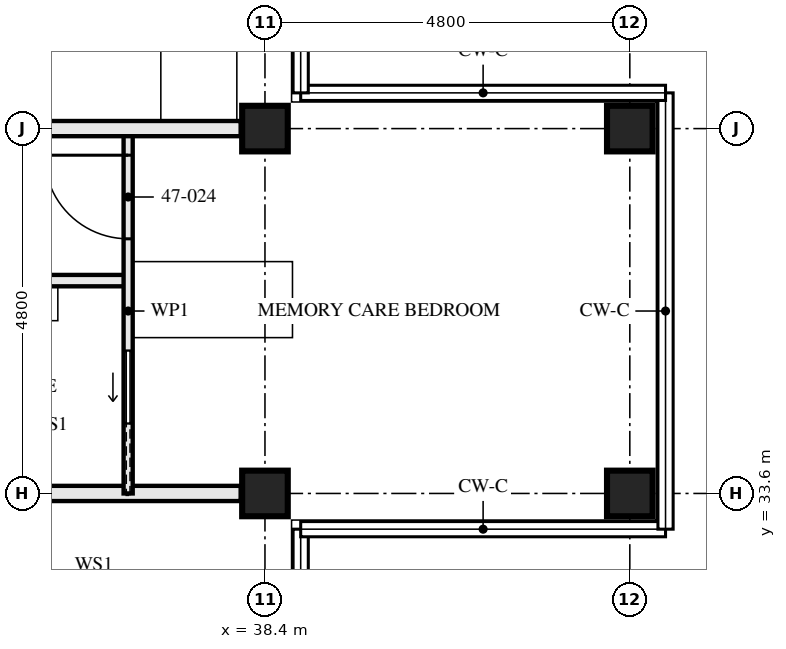
"""IFC4 building model, lengths in metres.
Left out: names, types, materials, properties, quantities, classifications, styles, units other than length and angle.
Written with IfcOpenShell. Run it as: python <this file> out.ifc"""

import sys

from ifc_helpers import new_model, si_unit, direction, frame, frame_2d, origin, origin_2d, place, context, subcontext, project, spatial, rectangle, hollow_rectangle, extrude, element, fill, save


model = new_model("IFC4")
c1 = context("Model", 3, precision=1e-05, world=origin(), true_north=direction((0.0, 1.0)))
c2 = subcontext(c1, "Body", "Model", "MODEL_VIEW")
j1 = project(units=[si_unit("LENGTHUNIT", "METRE"), si_unit("PLANEANGLEUNIT", "RADIAN")], contexts=[c1])
p1 = place(None, origin())
s1 = spatial("IfcSite", under=j1, at=p1, CompositionType="ELEMENT")
p2 = place(p1, origin())
s2 = spatial("IfcBuilding", under=s1, at=p2, CompositionType="ELEMENT")
p3 = place(p2, frame((0.0, 0.0, 172.5)))
s3 = spatial("IfcBuildingStorey", under=s2, at=p3, CompositionType="ELEMENT", Elevation=172.5)
for number, where, z_axis, x_axis in (
    (1, (38.4, 33.6, 0.0), (0.0, 0.0, 1.0), (0.0, 1.0, 0.0)),
    (2, (38.4, 38.4, 0.0), (0.0, 0.0, 1.0), (0.0, 1.0, 0.0)),
    (3, (43.2, 33.6, 0.0), (0.0, 0.0, 1.0), (0.0, 1.0, 0.0)),
    (4, (43.2, 38.4, 0.0), (0.0, 0.0, 1.0), (0.0, 1.0, 0.0)),
):
    element("IfcColumn", number, at=place(p3, frame(where, z_axis=z_axis, x_axis=x_axis)), inside=s3, PredefinedType="COLUMN", context=c2, shape_type="SweptSolid", body=[
        extrude(hollow_rectangle(XDim=0.6, YDim=0.6, WallThickness=0.08, at=origin_2d()), origin(), (0.0, 0.0, 1.0), 3.5),
    ])
p4 = place(p3, frame((38.08, 33.6, 0.0), z_axis=(0.0, 0.0, 1.0), x_axis=(-1.0, 0.0, 0.0)))
e5 = element("IfcWall", 5, at=p4, inside=s3, PredefinedType="PARTITIONING", context=c2, shape_type="SweptSolid", body=[
    extrude(rectangle(XDim=7.28, YDim=0.2, at=frame_2d((3.64, 0.0))), origin(), (0.0, 0.0, 1.0), 2.55),
])
p5 = place(p3, frame((36.6, 36.4, 0.0), z_axis=(0.0, 0.0, 1.0), x_axis=(-1.0, 0.0, 0.0)))
e6 = element("IfcWall", 6, at=p5, inside=s3, PredefinedType="PARTITIONING", context=c2, shape_type="SweptSolid", body=[
    extrude(rectangle(XDim=3.0, YDim=0.15, at=frame_2d((1.5, 0.0))), origin(), (0.0, 0.0, 1.0), 3.33),
])
p6 = place(p3, frame((36.6, 33.6, 0.0), z_axis=(0.0, 0.0, 1.0), x_axis=(0.0, 1.0, 0.0)))
e7 = element("IfcWall", 7, at=p6, inside=s3, PredefinedType="PARTITIONING", context=c2, shape_type="SweptSolid", body=[
    extrude(rectangle(XDim=4.8, YDim=0.12, at=frame_2d((2.4, 0.0))), origin(), (0.0, 0.0, 1.0), 3.33),
])
p7 = place(p6, frame((3.35, 0.0, 0.0)))
e8 = element("IfcOpeningElement", 8, at=p7, cuts=e7, PredefinedType="OPENING", context=c2, shape_type="SweptSolid", body=[
    extrude(rectangle(XDim=1.1, YDim=2.1, at=frame_2d((0.55, 1.05))), frame((0.0, 0.071, 0.0), z_axis=(0.0, -1.0, 0.0), x_axis=(1.0, 0.0, 0.0)), (0.0, 0.0, 1.0), 0.141),
])
p8 = place(p6, frame((0.925, 0.0, 0.0)))
e9 = element("IfcOpeningElement", 9, at=p8, cuts=e7, PredefinedType="OPENING", context=c2, shape_type="SweptSolid", body=[
    extrude(rectangle(XDim=0.95, YDim=2.1, at=frame_2d((0.475, 1.05))), frame((0.0, 0.071, 0.0), z_axis=(0.0, -1.0, 0.0), x_axis=(1.0, 0.0, 0.0)), (0.0, 0.0, 1.0), 0.141),
])
p9 = place(p3, frame((38.08, 38.4, 0.0), z_axis=(0.0, 0.0, 1.0), x_axis=(-1.0, 0.0, 0.0)))
e10 = element("IfcWall", 10, at=p9, inside=s3, PredefinedType="PARTITIONING", context=c2, shape_type="SweptSolid", body=[
    extrude(rectangle(XDim=7.28, YDim=0.2, at=frame_2d((3.64, 0.0))), origin(), (0.0, 0.0, 1.0), 2.55),
])
p10 = place(p7, origin())
e11 = element("IfcDoor", 11, at=p10, inside=s3, OperationType="SINGLE_SWING_LEFT", PredefinedType="DOOR", context=c2, shape_type="SweptSolid", body=[
    extrude(rectangle(XDim=1.1, YDim=2.1, at=frame_2d((0.55, 1.05))), frame((0.0, 0.022, 0.0), z_axis=(0.0, -1.0, 0.0), x_axis=(1.0, 0.0, 0.0)), (0.0, 0.0, 1.0), 0.044),
])
fill(e8, e11)
p11 = place(p8, origin())
e12 = element("IfcDoor", 12, at=p11, inside=s3, OperationType="SLIDING_TO_RIGHT", PredefinedType="DOOR", context=c2, shape_type="SweptSolid", body=[
    extrude(rectangle(XDim=0.95, YDim=2.1, at=frame_2d((0.475, 1.05))), frame((0.0, 0.022, 0.0), z_axis=(0.0, -1.0, 0.0), x_axis=(1.0, 0.0, 0.0)), (0.0, 0.0, 1.0), 0.044),
])
fill(e9, e12)
save(model, sys.argv[1])
